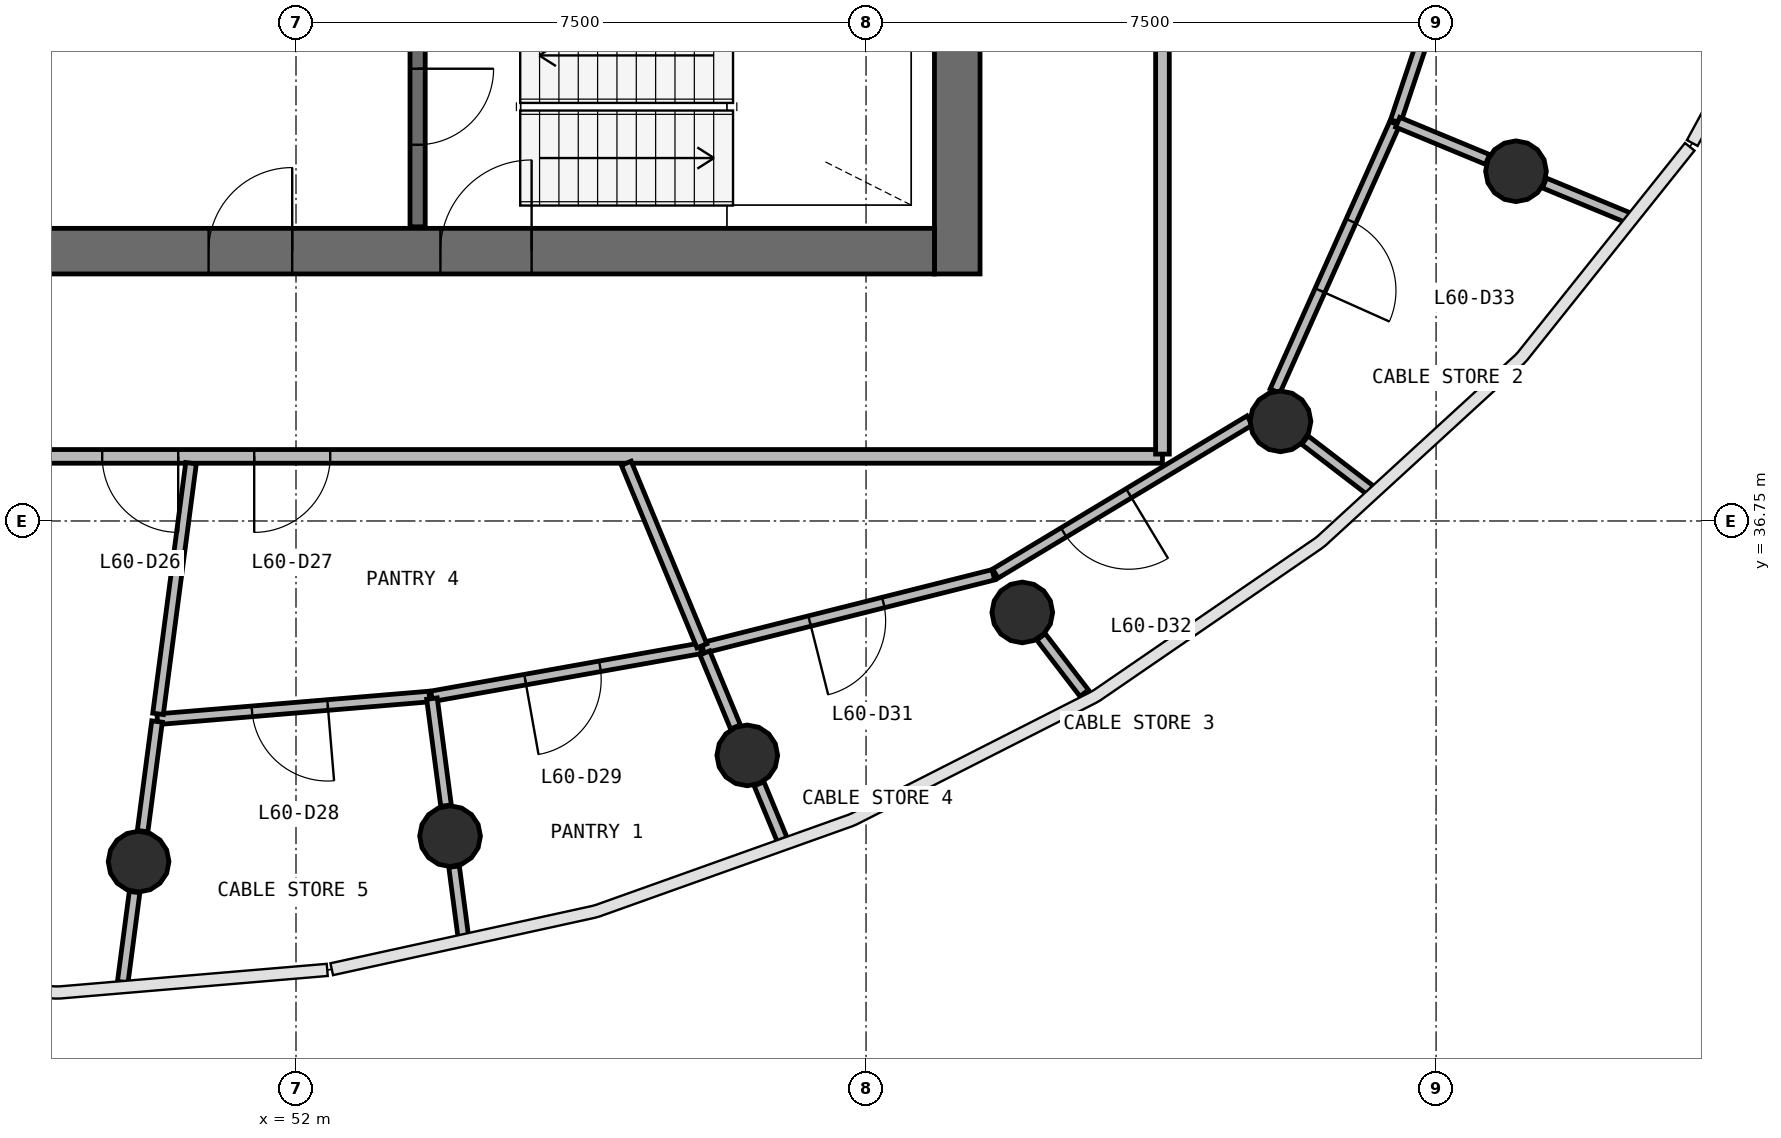
"""IFC4 building model, lengths in metres.
Left out: names, types, materials, properties, quantities, classifications, styles, units other than length and angle.
Written with IfcOpenShell. Run it as: python <this file> out.ifc"""

import sys

from ifc_helpers import new_model, si_unit, direction, frame, frame_2d, origin, origin_2d, place, context, subcontext, project, spatial, rectangle, circle, extrude, source, transform, mapped, element, fill, save


model = new_model("IFC4")
c1 = context("Model", 3, precision=1e-05, world=origin(), true_north=direction((0.0, 1.0)))
c2 = subcontext(c1, "Body", "Model", "MODEL_VIEW")
j1 = project(units=[si_unit("LENGTHUNIT", "METRE"), si_unit("PLANEANGLEUNIT", "RADIAN")], contexts=[c1])
p1 = place(None, origin())
s1 = spatial("IfcSite", under=j1, at=p1, CompositionType="ELEMENT")
p2 = place(p1, origin())
s2 = spatial("IfcBuilding", under=s1, at=p2, CompositionType="ELEMENT")
p3 = place(p2, frame((0.0, 0.0, 246.2)))
s3 = spatial("IfcBuildingStorey", under=s2, at=p3, CompositionType="ELEMENT", Elevation=246.2)
p4 = place(p3, frame((60.7, 40.0, 0.0), z_axis=(0.0, 0.0, 1.0), x_axis=(0.0, 1.0, 0.0)))
e1 = element("IfcWall", 1, at=p4, inside=s3, PredefinedType="SHEAR", context=c2, shape_type="SweptSolid", body=[
    extrude(rectangle(XDim=16.0, YDim=0.6, at=frame_2d((8.0, 0.0))), origin(), (0.0, 0.0, 1.0), 3.9),
])
p5 = place(p4, frame((7.1, 0.0, 0.0)))
e2 = element("IfcOpeningElement", 2, at=p5, cuts=e1, PredefinedType="OPENING", context=c2, shape_type="SweptSolid", body=[
    extrude(rectangle(XDim=1.8, YDim=2.1, at=frame_2d((0.9, 1.05))), frame((0.0, 0.31, 0.0), z_axis=(0.0, -1.0, 0.0), x_axis=(1.0, 0.0, 0.0)), (0.0, 0.0, 1.0), 0.62),
])
p6 = place(p3, frame((43.6, 40.3, 0.0), z_axis=(0.0, 0.0, 1.0), x_axis=(1.0, 0.0, 0.0)))
e3 = element("IfcWall", 3, at=p6, inside=s3, PredefinedType="SHEAR", context=c2, shape_type="SweptSolid", body=[
    extrude(rectangle(XDim=16.8, YDim=0.6, at=frame_2d((8.4, 0.0))), origin(), (0.0, 0.0, 1.0), 3.9),
])
p7 = place(p6, frame((10.3, 0.0, 0.0)))
e4 = element("IfcOpeningElement", 4, at=p7, cuts=e3, PredefinedType="OPENING", context=c2, shape_type="SweptSolid", body=[
    extrude(rectangle(XDim=1.2, YDim=2.1, at=frame_2d((0.6, 1.05))), frame((0.0, 0.31, 0.0), z_axis=(0.0, -1.0, 0.0), x_axis=(1.0, 0.0, 0.0)), (0.0, 0.0, 1.0), 0.62),
])
p8 = place(p6, frame((7.25, 0.0, 0.0)))
e5 = element("IfcOpeningElement", 5, at=p8, cuts=e3, PredefinedType="OPENING", context=c2, shape_type="SweptSolid", body=[
    extrude(rectangle(XDim=1.1, YDim=2.1, at=frame_2d((0.55, 1.05))), frame((0.0, 0.31, 0.0), z_axis=(0.0, -1.0, 0.0), x_axis=(1.0, 0.0, 0.0)), (0.0, 0.0, 1.0), 0.62),
])
p9 = place(p6, frame((0.7, 0.0, 0.0)))
e6 = element("IfcOpeningElement", 6, at=p9, cuts=e3, PredefinedType="OPENING", context=c2, shape_type="SweptSolid", body=[
    extrude(rectangle(XDim=0.8, YDim=2.1, at=frame_2d((0.4, 1.05))), frame((0.0, 0.31, 0.0), z_axis=(0.0, -1.0, 0.0), x_axis=(1.0, 0.0, 0.0)), (0.0, 0.0, 1.0), 0.62),
])
m1 = source(origin(), c2, "Body", "SweptSolid", [
    extrude(circle(Radius=0.4, at=origin_2d()), origin(), (0.0, 0.0, 1.0), 3.9),
])
for number, where, z_axis, x_axis in (
    (7, (49.929, 32.269, 0.0), (0.0, 0.0, 1.0), (1.0, 0.0, 0.0)),
    (8, (54.027, 32.604, 0.0), (0.0, 0.0, 1.0), (1.0, 0.0, 0.0)),
    (9, (57.937, 33.666, 0.0), (0.0, 0.0, 1.0), (1.0, 0.0, 0.0)),
    (10, (61.556, 35.547, 0.0), (0.0, 0.0, 1.0), (1.0, 0.0, 0.0)),
    (11, (64.953, 38.061, 0.0), (0.0, 0.0, 1.0), (1.0, 0.0, 0.0)),
    (12, (68.052, 41.351, 0.0), (0.0, 0.0, 1.0), (1.0, 0.0, 0.0)),
):
    element("IfcColumn", number, at=place(p3, frame(where, z_axis=z_axis, x_axis=x_axis)), inside=s3, PredefinedType="COLUMN", context=c2, shape_type="MappedRepresentation", body=[
        mapped(m1, transform((0.0, 0.0, 0.0), scale=1.0)),
    ])
p10 = place(p3, frame((53.6, 43.6, 0.0), z_axis=(0.0, 0.0, 1.0), x_axis=(0.0, -1.0, 0.0)))
e13 = element("IfcWall", 13, at=p10, inside=s3, PredefinedType="SOLIDWALL", context=c2, shape_type="SweptSolid", body=[
    extrude(rectangle(XDim=2.98, YDim=0.2, at=frame_2d((1.49, 0.0))), origin(), (0.0, 0.0, 1.0), 3.58),
])
p11 = place(p10, frame((0.9, 0.0, 0.0)))
e14 = element("IfcOpeningElement", 14, at=p11, cuts=e13, PredefinedType="OPENING", context=c2, shape_type="SweptSolid", body=[
    extrude(rectangle(XDim=1.0, YDim=2.1, at=frame_2d((0.5, 1.05))), frame((0.0, 0.11, 0.0), z_axis=(0.0, -1.0, 0.0), x_axis=(1.0, 0.0, 0.0)), (0.0, 0.0, 1.0), 0.22),
])
p12 = place(p3, frame((63.4, 37.6, 0.0), z_axis=(0.0, 0.0, 1.0), x_axis=(-1.0, 0.0, 0.0)))
e15 = element("IfcWall", 15, at=p12, inside=s3, PredefinedType="PARTITIONING", context=c2, shape_type="SweptSolid", body=[
    extrude(rectangle(XDim=22.8, YDim=0.18, at=frame_2d((11.4, 0.0))), origin(), (0.0, 0.0, 1.0), 2.88),
])
p13 = place(p12, frame((12.95, 0.0, 0.0)))
e16 = element("IfcOpeningElement", 16, at=p13, cuts=e15, PredefinedType="OPENING", context=c2, shape_type="SweptSolid", body=[
    extrude(rectangle(XDim=1.0, YDim=2.1, at=frame_2d((0.5, 1.05))), frame((0.0, 0.1, 0.0), z_axis=(0.0, -1.0, 0.0), x_axis=(1.0, 0.0, 0.0)), (0.0, 0.0, 1.0), 0.2),
])
p14 = place(p12, frame((10.95, 0.0, 0.0)))
e17 = element("IfcOpeningElement", 17, at=p14, cuts=e15, PredefinedType="OPENING", context=c2, shape_type="SweptSolid", body=[
    extrude(rectangle(XDim=1.0, YDim=2.1, at=frame_2d((0.5, 1.05))), frame((0.0, 0.1, 0.0), z_axis=(0.0, -1.0, 0.0), x_axis=(1.0, 0.0, 0.0)), (0.0, 0.0, 1.0), 0.2),
])
p15 = place(p3, frame((63.4, 58.37, 0.0), z_axis=(0.0, 0.0, 1.0), x_axis=(0.0, -1.0, 0.0)))
e18 = element("IfcWall", 18, at=p15, inside=s3, PredefinedType="PARTITIONING", context=c2, shape_type="SweptSolid", body=[
    extrude(rectangle(XDim=20.74, YDim=0.18, at=frame_2d((10.37, 0.0))), origin(), (0.0, 0.0, 1.0), 2.88),
])
p16 = place(p15, frame((12.09, 0.0, 0.0)))
e19 = element("IfcOpeningElement", 19, at=p16, cuts=e18, PredefinedType="OPENING", context=c2, shape_type="SweptSolid", body=[
    extrude(rectangle(XDim=1.0, YDim=2.1, at=frame_2d((0.5, 1.05))), frame((0.0, 0.1, 0.0), z_axis=(0.0, -1.0, 0.0), x_axis=(1.0, 0.0, 0.0)), (0.0, 0.0, 1.0), 0.2),
])
p17 = place(p15, frame((9.89, 0.0, 0.0)))
e20 = element("IfcOpeningElement", 20, at=p17, cuts=e18, PredefinedType="OPENING", context=c2, shape_type="SweptSolid", body=[
    extrude(rectangle(XDim=1.0, YDim=2.1, at=frame_2d((0.5, 1.05))), frame((0.0, 0.1, 0.0), z_axis=(0.0, -1.0, 0.0), x_axis=(1.0, 0.0, 0.0)), (0.0, 0.0, 1.0), 0.2),
])
p18 = place(p15, frame((4.29, 0.0, 0.0)))
e21 = element("IfcOpeningElement", 21, at=p18, cuts=e18, PredefinedType="OPENING", context=c2, shape_type="SweptSolid", body=[
    extrude(rectangle(XDim=1.0, YDim=2.1, at=frame_2d((0.5, 1.05))), frame((0.0, 0.1, 0.0), z_axis=(0.0, -1.0, 0.0), x_axis=(1.0, 0.0, 0.0)), (0.0, 0.0, 1.0), 0.2),
])
p19 = place(p3, frame((67.754, 45.855, 0.0), z_axis=(0.0, 0.0, 1.0), x_axis=(-0.317003922607, -0.94842422631, 0.0)))
e22 = element("IfcWall", 22, at=p19, inside=s3, PredefinedType="PARTITIONING", context=c2, shape_type="SweptSolid", body=[
    extrude(rectangle(XDim=4.057, YDim=0.14, at=frame_2d((2.029, 0.0))), origin(), (0.0, 0.0, 1.0), 2.88),
])
p20 = place(p19, frame((1.607, 0.0, 0.0)))
e23 = element("IfcOpeningElement", 23, at=p20, cuts=e22, PredefinedType="OPENING", context=c2, shape_type="SweptSolid", body=[
    extrude(rectangle(XDim=1.0, YDim=2.1, at=frame_2d((0.5, 1.05))), frame((0.0, 0.08, 0.0), z_axis=(0.0, -1.0, 0.0), x_axis=(1.0, 0.0, 0.0)), (0.0, 0.0, 1.0), 0.16),
])
p21 = place(p3, frame((61.176, 36.042, 0.0), z_axis=(0.0, 0.0, 1.0), x_axis=(-0.969740538579, -0.244137845972, 0.0)))
e24 = element("IfcWall", 24, at=p21, inside=s3, PredefinedType="PARTITIONING", context=c2, shape_type="SweptSolid", body=[
    extrude(rectangle(XDim=3.943, YDim=0.14, at=frame_2d((1.972, 0.0))), origin(), (0.0, 0.0, 1.0), 2.88),
])
p22 = place(p21, frame((1.493, 0.0, 0.0)))
e25 = element("IfcOpeningElement", 25, at=p22, cuts=e24, PredefinedType="OPENING", context=c2, shape_type="SweptSolid", body=[
    extrude(rectangle(XDim=1.0, YDim=2.1, at=frame_2d((0.5, 1.05))), frame((0.0, 0.08, 0.0), z_axis=(0.0, -1.0, 0.0), x_axis=(1.0, 0.0, 0.0)), (0.0, 0.0, 1.0), 0.16),
])
p23 = place(p3, frame((64.549, 38.073, 0.0), z_axis=(0.0, 0.0, 1.0), x_axis=(-0.856692428514, -0.515827570925, 0.0)))
e26 = element("IfcWall", 26, at=p23, inside=s3, PredefinedType="PARTITIONING", context=c2, shape_type="SweptSolid", body=[
    extrude(rectangle(XDim=3.907, YDim=0.14, at=frame_2d((1.954, 0.0))), origin(), (0.0, 0.0, 1.0), 2.88),
])
p24 = place(p23, frame((1.857, 0.0, 0.0)))
e27 = element("IfcOpeningElement", 27, at=p24, cuts=e26, PredefinedType="OPENING", context=c2, shape_type="SweptSolid", body=[
    extrude(rectangle(XDim=1.0, YDim=2.1, at=frame_2d((0.5, 1.05))), frame((0.0, 0.08, 0.0), z_axis=(0.0, -1.0, 0.0), x_axis=(1.0, 0.0, 0.0)), (0.0, 0.0, 1.0), 0.16),
])
p25 = place(p3, frame((66.455, 41.98, 0.0), z_axis=(0.0, 0.0, 1.0), x_axis=(-0.40831609547, -0.912840602833, 0.0)))
e28 = element("IfcWall", 28, at=p25, inside=s3, PredefinedType="PARTITIONING", context=c2, shape_type="SweptSolid", body=[
    extrude(rectangle(XDim=3.857, YDim=0.14, at=frame_2d((1.929, 0.0))), origin(), (0.0, 0.0, 1.0), 2.88),
])
p26 = place(p25, frame((1.407, 0.0, 0.0)))
e29 = element("IfcOpeningElement", 29, at=p26, cuts=e28, PredefinedType="OPENING", context=c2, shape_type="SweptSolid", body=[
    extrude(rectangle(XDim=1.0, YDim=2.1, at=frame_2d((0.5, 1.05))), frame((0.0, 0.08, 0.0), z_axis=(0.0, -1.0, 0.0), x_axis=(1.0, 0.0, 0.0)), (0.0, 0.0, 1.0), 0.16),
])
p27 = place(p3, frame((57.322, 35.074, 0.0), z_axis=(0.0, 0.0, 1.0), x_axis=(-0.984454859215, -0.175637781149, 0.0)))
e30 = element("IfcWall", 30, at=p27, inside=s3, PredefinedType="PARTITIONING", context=c2, shape_type="SweptSolid", body=[
    extrude(rectangle(XDim=3.593, YDim=0.14, at=frame_2d((1.797, 0.0))), origin(), (0.0, 0.0, 1.0), 2.88),
])
p28 = place(p27, frame((1.344, 0.0, 0.0)))
e31 = element("IfcOpeningElement", 31, at=p28, cuts=e30, PredefinedType="OPENING", context=c2, shape_type="SweptSolid", body=[
    extrude(rectangle(XDim=1.0, YDim=2.1, at=frame_2d((0.5, 1.05))), frame((0.0, 0.08, 0.0), z_axis=(0.0, -1.0, 0.0), x_axis=(1.0, 0.0, 0.0)), (0.0, 0.0, 1.0), 0.16),
])
p29 = place(p3, frame((53.755, 34.441, 0.0), z_axis=(0.0, 0.0, 1.0), x_axis=(-0.996527452157, -0.083264861121, 0.0)))
e32 = element("IfcWall", 32, at=p29, inside=s3, PredefinedType="PARTITIONING", context=c2, shape_type="SweptSolid", body=[
    extrude(rectangle(XDim=3.592, YDim=0.14, at=frame_2d((1.796, 0.0))), origin(), (0.0, 0.0, 1.0), 2.88),
])
p30 = place(p29, frame((1.342, 0.0, 0.0)))
e33 = element("IfcOpeningElement", 33, at=p30, cuts=e32, PredefinedType="OPENING", context=c2, shape_type="SweptSolid", body=[
    extrude(rectangle(XDim=1.0, YDim=2.1, at=frame_2d((0.5, 1.05))), frame((0.0, 0.08, 0.0), z_axis=(0.0, -1.0, 0.0), x_axis=(1.0, 0.0, 0.0)), (0.0, 0.0, 1.0), 0.16),
])
p31 = place(p3, frame((50.619, 37.51, 0.0), z_axis=(0.0, 0.0, 1.0), x_axis=(-0.130509576708, -0.991447048706, 0.0)))
e34 = element("IfcWall", 34, at=p31, inside=s3, PredefinedType="PARTITIONING", context=c2, shape_type="SweptSolid", body=[
    extrude(rectangle(XDim=3.326, YDim=0.14, at=frame_2d((1.663, 0.0))), origin(), (0.0, 0.0, 1.0), 2.88),
])
p32 = place(p3, frame((56.345, 37.51, 0.0), z_axis=(0.0, 0.0, 1.0), x_axis=(0.382661342222, -0.923888682239, 0.0)))
e35 = element("IfcWall", 35, at=p32, inside=s3, PredefinedType="PARTITIONING", context=c2, shape_type="SweptSolid", body=[
    extrude(rectangle(XDim=2.601, YDim=0.14, at=frame_2d((1.3, 0.0))), origin(), (0.0, 0.0, 1.0), 2.88),
])
p33 = place(p3, frame((50.172, 34.112, 0.0), z_axis=(0.0, 0.0, 1.0), x_axis=(-0.130602153648, -0.991434857902, 0.0)))
e36 = element("IfcWall", 36, at=p33, inside=s3, PredefinedType="PARTITIONING", context=c2, shape_type="SweptSolid", body=[
    extrude(rectangle(XDim=1.454, YDim=0.14, at=frame_2d((0.727, 0.0))), origin(), (0.0, 0.0, 1.0), 2.88),
])
p34 = place(p3, frame((53.789, 34.413, 0.0), z_axis=(0.0, 0.0, 1.0), x_axis=(0.130441175626, -0.991456050313, 0.0)))
e37 = element("IfcWall", 37, at=p34, inside=s3, PredefinedType="PARTITIONING", context=c2, shape_type="SweptSolid", body=[
    extrude(rectangle(XDim=1.421, YDim=0.14, at=frame_2d((0.71, 0.0))), origin(), (0.0, 0.0, 1.0), 2.88),
])
p35 = place(p3, frame((66.495, 41.996, 0.0), z_axis=(0.0, 0.0, 1.0), x_axis=(0.923826077578, -0.382812458505, 0.0)))
e38 = element("IfcWall", 38, at=p35, inside=s3, PredefinedType="PARTITIONING", context=c2, shape_type="SweptSolid", body=[
    extrude(rectangle(XDim=1.279, YDim=0.14, at=frame_2d((0.64, 0.0))), origin(), (0.0, 0.0, 1.0), 2.88),
])
p36 = place(p3, frame((68.426, 41.196, 0.0), z_axis=(0.0, 0.0, 1.0), x_axis=(0.923850829611, -0.382752719947, 0.0)))
e39 = element("IfcWall", 39, at=p36, inside=s3, PredefinedType="PARTITIONING", context=c2, shape_type="SweptSolid", body=[
    extrude(rectangle(XDim=1.201, YDim=0.14, at=frame_2d((0.601, 0.0))), origin(), (0.0, 0.0, 1.0), 2.88),
])
p37 = place(p3, frame((49.876, 31.868, 0.0), z_axis=(0.0, 0.0, 1.0), x_axis=(-0.130570798277, -0.991438987854, 0.0)))
e40 = element("IfcWall", 40, at=p37, inside=s3, PredefinedType="PARTITIONING", context=c2, shape_type="SweptSolid", body=[
    extrude(rectangle(XDim=1.195, YDim=0.14, at=frame_2d((0.597, 0.0))), origin(), (0.0, 0.0, 1.0), 2.88),
])
p38 = place(p3, frame((57.379, 35.014, 0.0), z_axis=(0.0, 0.0, 1.0), x_axis=(0.382624538487, -0.923903924955, 0.0)))
e41 = element("IfcWall", 41, at=p38, inside=s3, PredefinedType="PARTITIONING", context=c2, shape_type="SweptSolid", body=[
    extrude(rectangle(XDim=1.054, YDim=0.14, at=frame_2d((0.527, 0.0))), origin(), (0.0, 0.0, 1.0), 2.88),
])
p39 = place(p3, frame((65.274, 37.814, 0.0), z_axis=(0.0, 0.0, 1.0), x_axis=(0.793403043082, -0.608696649596, 0.0)))
e42 = element("IfcWall", 42, at=p39, inside=s3, PredefinedType="PARTITIONING", context=c2, shape_type="SweptSolid", body=[
    extrude(rectangle(XDim=1.083, YDim=0.14, at=frame_2d((0.541, 0.0))), origin(), (0.0, 0.0, 1.0), 2.88),
])
p40 = place(p3, frame((61.802, 35.226, 0.0), z_axis=(0.0, 0.0, 1.0), x_axis=(0.60870024899, -0.793400281623, 0.0)))
e43 = element("IfcWall", 43, at=p40, inside=s3, PredefinedType="PARTITIONING", context=c2, shape_type="SweptSolid", body=[
    extrude(rectangle(XDim=0.935, YDim=0.14, at=frame_2d((0.467, 0.0))), origin(), (0.0, 0.0, 1.0), 2.88),
])
p41 = place(p3, frame((54.08, 32.203, 0.0), z_axis=(0.0, 0.0, 1.0), x_axis=(0.130693553311, -0.991422813497, 0.0)))
e44 = element("IfcWall", 44, at=p41, inside=s3, PredefinedType="PARTITIONING", context=c2, shape_type="SweptSolid", body=[
    extrude(rectangle(XDim=0.925, YDim=0.14, at=frame_2d((0.462, 0.0))), origin(), (0.0, 0.0, 1.0), 2.88),
])
p42 = place(p3, frame((58.092, 33.292, 0.0), z_axis=(0.0, 0.0, 1.0), x_axis=(0.382669005831, -0.923885508045, 0.0)))
e45 = element("IfcWall", 45, at=p42, inside=s3, PredefinedType="PARTITIONING", context=c2, shape_type="SweptSolid", body=[
    extrude(rectangle(XDim=0.793, YDim=0.14, at=frame_2d((0.396, 0.0))), origin(), (0.0, 0.0, 1.0), 2.88),
])
m2 = source(origin(), c2, "Body", "SweptSolid", [
    extrude(rectangle(XDim=1.2, YDim=2.1, at=frame_2d((0.6, 1.05))), frame((0.0, 0.025, 0.0), z_axis=(0.0, -1.0, 0.0), x_axis=(1.0, 0.0, 0.0)), (0.0, 0.0, 1.0), 0.05),
])
p43 = place(p7, origin())
e46 = element("IfcDoor", 46, at=p43, inside=s3, OperationType="SINGLE_SWING_RIGHT", PredefinedType="DOOR", context=c2, shape_type="MappedRepresentation", body=[
    mapped(m2, transform((0.0, 0.0, 0.0), scale=1.0)),
])
fill(e4, e46)
m3 = source(origin(), c2, "Body", "SweptSolid", [
    extrude(rectangle(XDim=1.0, YDim=2.1, at=frame_2d((0.5, 1.05))), frame((0.0, 0.025, 0.0), z_axis=(0.0, -1.0, 0.0), x_axis=(1.0, 0.0, 0.0)), (0.0, 0.0, 1.0), 0.05),
])
p44 = place(p11, origin())
e47 = element("IfcDoor", 47, at=p44, inside=s3, OperationType="SINGLE_SWING_LEFT", PredefinedType="DOOR", context=c2, shape_type="MappedRepresentation", body=[
    mapped(m3, transform((0.0, 0.0, 0.0), scale=1.0)),
])
fill(e14, e47)
m4 = source(origin(), c2, "Body", "SweptSolid", [
    extrude(rectangle(XDim=1.1, YDim=2.1, at=frame_2d((0.55, 1.05))), frame((0.0, 0.025, 0.0), z_axis=(0.0, -1.0, 0.0), x_axis=(1.0, 0.0, 0.0)), (0.0, 0.0, 1.0), 0.05),
])
p45 = place(p8, origin())
e48 = element("IfcDoor", 48, at=p45, inside=s3, OperationType="SINGLE_SWING_RIGHT", PredefinedType="DOOR", context=c2, shape_type="MappedRepresentation", body=[
    mapped(m4, transform((0.0, 0.0, 0.0), scale=1.0)),
])
fill(e5, e48)
m5 = source(origin(), c2, "Body", "SweptSolid", [
    extrude(rectangle(XDim=1.0, YDim=2.1, at=frame_2d((0.5, 1.05))), frame((0.0, 0.025, 0.0), z_axis=(0.0, -1.0, 0.0), x_axis=(1.0, 0.0, 0.0)), (0.0, 0.0, 1.0), 0.05),
])
p46 = place(p13, origin())
e49 = element("IfcDoor", 49, at=p46, inside=s3, OperationType="SINGLE_SWING_LEFT", PredefinedType="DOOR", context=c2, shape_type="MappedRepresentation", body=[
    mapped(m5, transform((0.0, 0.0, 0.0), scale=1.0)),
])
fill(e16, e49)
p47 = place(p14, origin())
e50 = element("IfcDoor", 50, at=p47, inside=s3, OperationType="SINGLE_SWING_RIGHT", PredefinedType="DOOR", context=c2, shape_type="MappedRepresentation", body=[
    mapped(m5, transform((0.0, 0.0, 0.0), scale=1.0)),
])
fill(e17, e50)
p48 = place(p30, origin())
e51 = element("IfcDoor", 51, at=p48, inside=s3, OperationType="SINGLE_SWING_LEFT", PredefinedType="DOOR", context=c2, shape_type="MappedRepresentation", body=[
    mapped(m5, transform((0.0, 0.0, 0.0), scale=1.0)),
])
fill(e33, e51)
p49 = place(p28, origin())
e52 = element("IfcDoor", 52, at=p49, inside=s3, OperationType="SINGLE_SWING_RIGHT", PredefinedType="DOOR", context=c2, shape_type="MappedRepresentation", body=[
    mapped(m5, transform((0.0, 0.0, 0.0), scale=1.0)),
])
fill(e31, e52)
p50 = place(p22, origin())
e53 = element("IfcDoor", 53, at=p50, inside=s3, OperationType="SINGLE_SWING_RIGHT", PredefinedType="DOOR", context=c2, shape_type="MappedRepresentation", body=[
    mapped(m5, transform((0.0, 0.0, 0.0), scale=1.0)),
])
fill(e25, e53)
p51 = place(p24, origin())
e54 = element("IfcDoor", 54, at=p51, inside=s3, OperationType="SINGLE_SWING_LEFT", PredefinedType="DOOR", context=c2, shape_type="MappedRepresentation", body=[
    mapped(m5, transform((0.0, 0.0, 0.0), scale=1.0)),
])
fill(e27, e54)
p52 = place(p26, origin())
e55 = element("IfcDoor", 55, at=p52, inside=s3, OperationType="SINGLE_SWING_RIGHT", PredefinedType="DOOR", context=c2, shape_type="MappedRepresentation", body=[
    mapped(m5, transform((0.0, 0.0, 0.0), scale=1.0)),
])
fill(e29, e55)
save(model, sys.argv[1])
